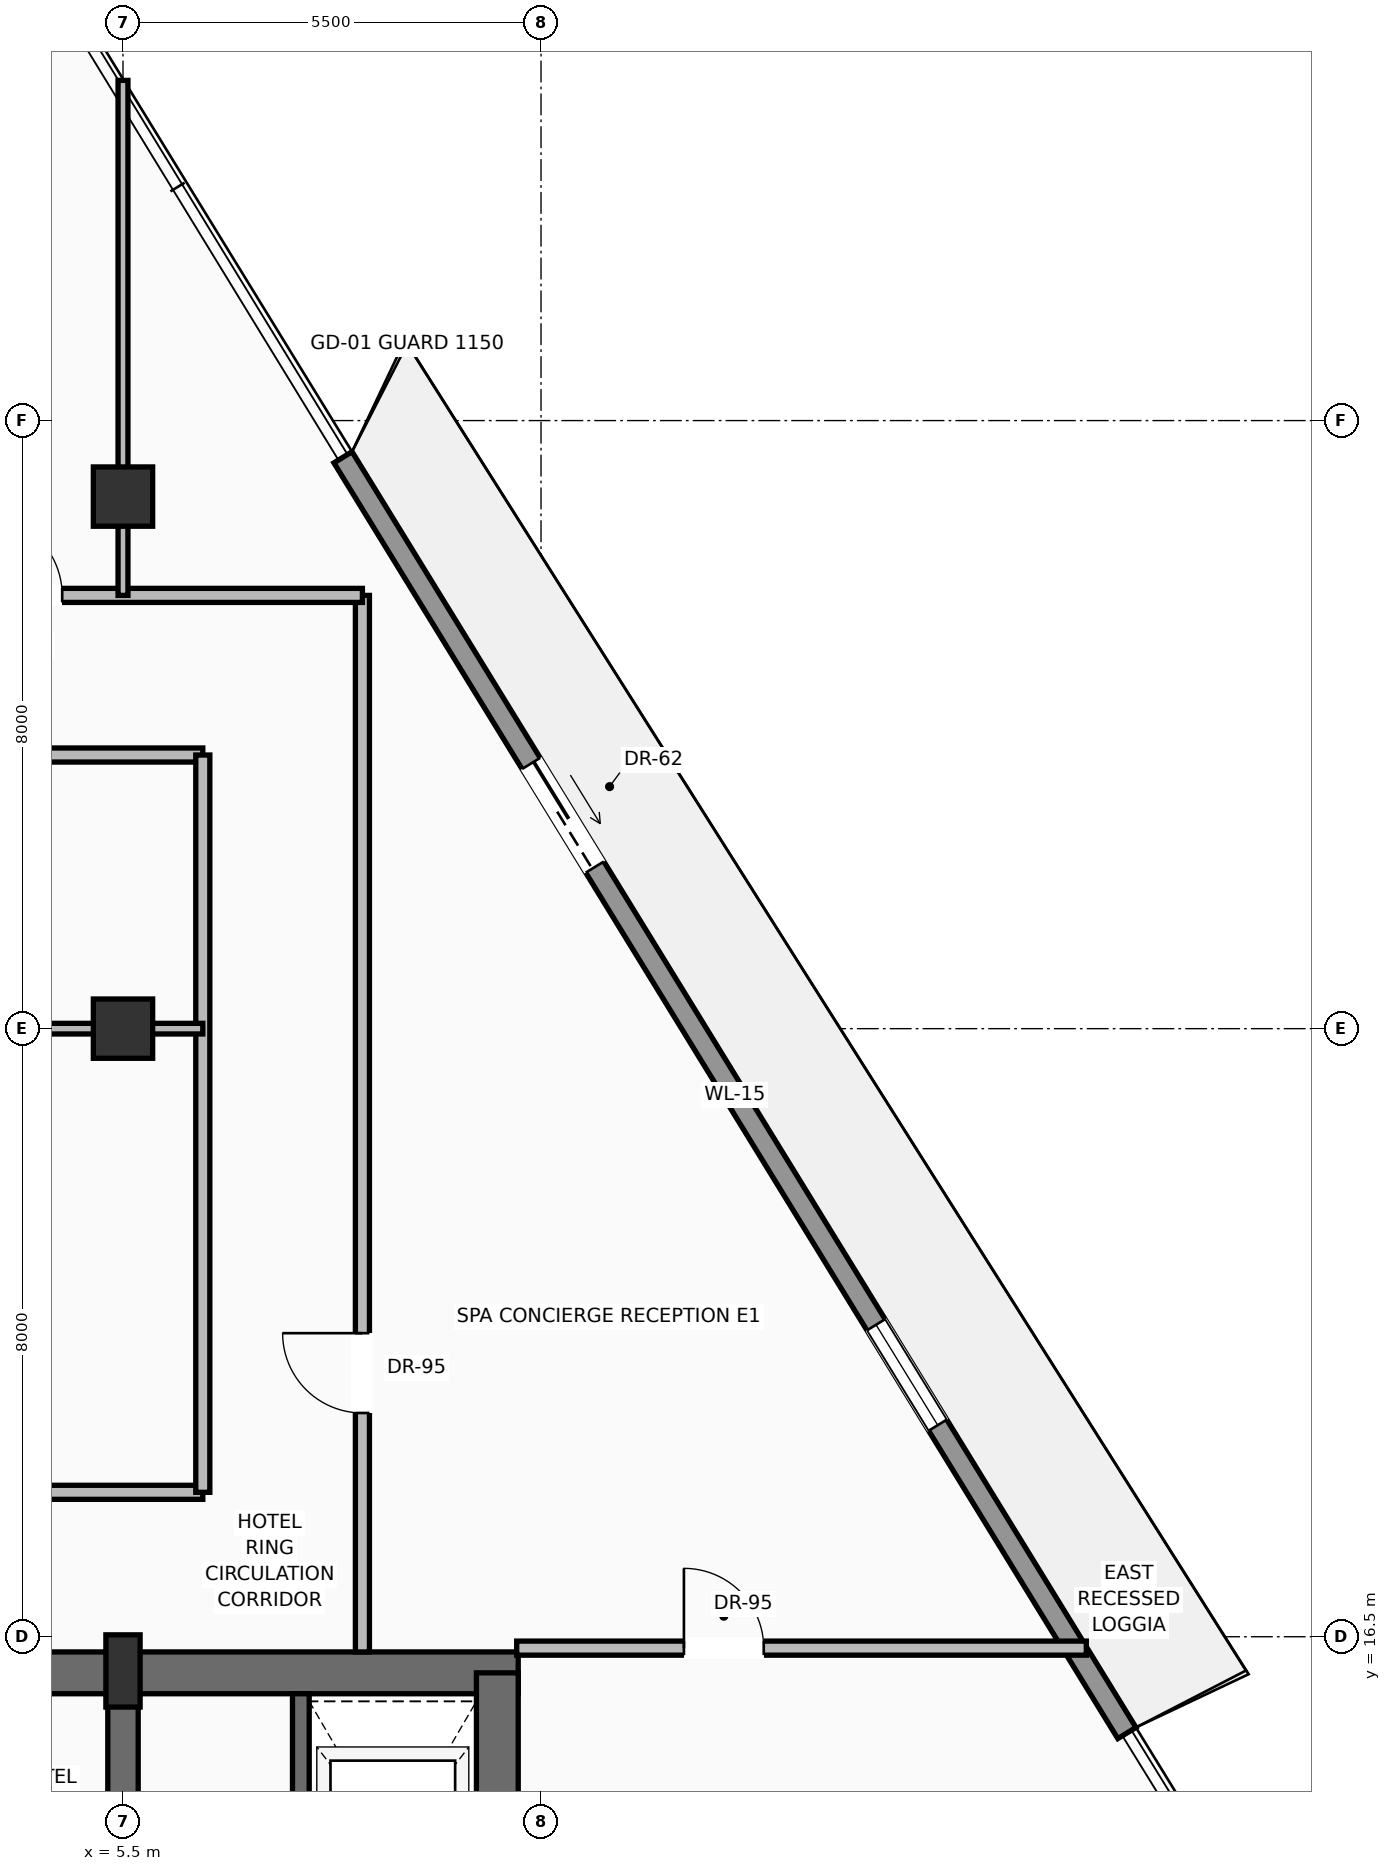
"""IFC4 building model, lengths in metres.
Left out: names, types, materials, properties, quantities, classifications, styles, units other than length and angle.
Written with IfcOpenShell. Run it as: python <this file> out.ifc"""

import sys

from ifc_helpers import new_model, si_unit, direction, frame, frame_2d, origin, origin_2d, place, context, subcontext, project, spatial, rectangle, extrude, source, transform, mapped, element, fill, save


model = new_model("IFC4")
c1 = context("Model", 3, precision=1e-05, world=origin(), true_north=direction((0.0, 1.0)))
c2 = subcontext(c1, "Body", "Model", "MODEL_VIEW")
j1 = project(units=[si_unit("LENGTHUNIT", "METRE"), si_unit("PLANEANGLEUNIT", "RADIAN")], contexts=[c1])
p1 = place(None, origin())
s1 = spatial("IfcSite", under=j1, at=p1, CompositionType="ELEMENT")
p2 = place(p1, origin())
s2 = spatial("IfcBuilding", under=s1, at=p2, CompositionType="ELEMENT")
p3 = place(p2, frame((0.0, 0.0, 244.15)))
s3 = spatial("IfcBuildingStorey", under=s2, at=p3, CompositionType="ELEMENT", Elevation=244.15)
p4 = place(p3, frame((-10.7, 16.025, 0.0), z_axis=(0.0, 0.0, 1.0), x_axis=(1.0, 0.0, 0.0)))
e1 = element("IfcWall", 1, at=p4, inside=s3, PredefinedType="SHEAR", context=c2, shape_type="SweptSolid", body=[
    extrude(rectangle(XDim=21.4, YDim=0.55, at=frame_2d((10.7, 0.0))), origin(), (0.0, 0.0, 1.0), 3.24),
])
p5 = place(p4, frame((3.27, 0.0, 0.0)))
e2 = element("IfcOpeningElement", 2, at=p5, cuts=e1, PredefinedType="OPENING", context=c2, shape_type="SweptSolid", body=[
    extrude(rectangle(XDim=1.3, YDim=2.3, at=frame_2d((0.65, 1.15))), frame((0.0, 0.285, 0.0), z_axis=(0.0, -1.0, 0.0), x_axis=(1.0, 0.0, 0.0)), (0.0, 0.0, 1.0), 0.57),
])
p6 = place(p4, frame((9.7, 0.0, 0.0)))
e3 = element("IfcOpeningElement", 3, at=p6, cuts=e1, PredefinedType="OPENING", context=c2, shape_type="SweptSolid", body=[
    extrude(rectangle(XDim=2.0, YDim=2.4, at=frame_2d((1.0, 1.2))), frame((0.0, 0.285, 0.0), z_axis=(0.0, -1.0, 0.0), x_axis=(1.0, 0.0, 0.0)), (0.0, 0.0, 1.0), 0.57),
])
p7 = place(p3, frame((10.425, 0.575, 0.0), z_axis=(0.0, 0.0, 1.0), x_axis=(0.0, 1.0, 0.0)))
e4 = element("IfcWall", 4, at=p7, inside=s3, PredefinedType="SHEAR", context=c2, shape_type="SweptSolid", body=[
    extrude(rectangle(XDim=15.45, YDim=0.55, at=frame_2d((7.725, 0.0))), origin(), (0.0, 0.0, 1.0), 3.24),
])
p8 = place(p3, frame((5.5, 0.575, 0.0), z_axis=(0.0, 0.0, 1.0), x_axis=(0.0, 1.0, 0.0)))
e5 = element("IfcWall", 5, at=p8, inside=s3, PredefinedType="SHEAR", context=c2, shape_type="SweptSolid", body=[
    extrude(rectangle(XDim=15.45, YDim=0.4, at=frame_2d((7.725, 0.0))), origin(), (0.0, 0.0, 1.0), 3.24),
])
p9 = place(p8, frame((8.925, 0.0, 0.0)))
e6 = element("IfcOpeningElement", 6, at=p9, cuts=e5, PredefinedType="OPENING", context=c2, shape_type="SweptSolid", body=[
    extrude(rectangle(XDim=1.1, YDim=2.2, at=frame_2d((0.55, 1.1))), frame((0.0, 0.21, 0.0), z_axis=(0.0, -1.0, 0.0), x_axis=(1.0, 0.0, 0.0)), (0.0, 0.0, 1.0), 0.42),
])
m1 = source(origin(), c2, "Body", "SweptSolid", [
    extrude(rectangle(XDim=0.45, YDim=0.95, at=origin_2d()), origin(), (0.0, 0.0, 1.0), 3.45),
])
p10 = place(p3, frame((5.5, 16.05, 0.0), z_axis=(0.0, 0.0, 1.0), x_axis=(1.0, 0.0, 0.0)))
e7 = element("IfcColumn", 7, at=p10, inside=s3, PredefinedType="PILASTER", context=c2, shape_type="MappedRepresentation", body=[
    mapped(m1, transform((0.0, 0.0, 0.0), scale=1.0)),
])
m2 = source(origin(), c2, "Body", "SweptSolid", [
    extrude(rectangle(XDim=0.78, YDim=0.78, at=origin_2d()), origin(), (0.0, 0.0, 1.0), 3.45),
])
for number, where, z_axis, x_axis in (
    (8, (5.5, 24.5, 0.0), (0.0, 0.0, 1.0), (1.0, 0.0, 0.0)),
    (9, (5.5, 31.5, 0.0), (0.0, 0.0, 1.0), (1.0, 0.0, 0.0)),
):
    element("IfcColumn", number, at=place(p3, frame(where, z_axis=z_axis, x_axis=x_axis)), inside=s3, PredefinedType="COLUMN", context=c2, shape_type="MappedRepresentation", body=[
        mapped(m2, transform((0.0, 0.0, 0.0), scale=1.0)),
    ])
p11 = place(p3, frame((8.394, 32.017, 0.0), z_axis=(0.0, 0.0, 1.0), x_axis=(0.523559364354, -0.851989197113, 0.0)))
e10 = element("IfcWall", 10, at=p11, inside=s3, PredefinedType="SOLIDWALL", context=c2, shape_type="SweptSolid", body=[
    extrude(rectangle(XDim=19.7, YDim=0.28, at=frame_2d((9.85, 0.0))), origin(), (0.0, 0.0, 1.0), 2.82),
])
p12 = place(p11, frame((4.728, 0.0, 0.0)))
e11 = element("IfcOpeningElement", 11, at=p12, cuts=e10, PredefinedType="OPENING", context=c2, shape_type="SweptSolid", body=[
    extrude(rectangle(XDim=1.6, YDim=2.35, at=frame_2d((0.8, 1.175))), frame((0.0, 0.15, 0.0), z_axis=(0.0, -1.0, 0.0), x_axis=(1.0, 0.0, 0.0)), (0.0, 0.0, 1.0), 0.3),
])
p13 = place(p11, frame((13.396, 0.0, 0.9)))
e12 = element("IfcOpeningElement", 12, at=p13, cuts=e10, PredefinedType="OPENING", context=c2, shape_type="SweptSolid", body=[
    extrude(rectangle(XDim=1.55, YDim=1.75, at=frame_2d((0.775, 0.875))), frame((0.0, 0.15, 0.0), z_axis=(0.0, -1.0, 0.0), x_axis=(1.0, 0.0, 0.0)), (0.0, 0.0, 1.0), 0.3),
])
p14 = place(p3, frame((7.84, 11.87, 0.0), z_axis=(0.0, 0.0, 1.0), x_axis=(0.0, 1.0, 0.0)))
e13 = element("IfcWall", 13, at=p14, inside=s3, PredefinedType="SOLIDWALL", context=c2, shape_type="SweptSolid", body=[
    extrude(rectangle(XDim=3.88, YDim=0.22, at=frame_2d((1.94, 0.0))), origin(), (0.0, 0.0, 1.0), 3.24),
])
p15 = place(p3, frame((-5.85, 18.4, 0.0), z_axis=(0.0, 0.0, 1.0), x_axis=(1.0, 0.0, 0.0)))
e14 = element("IfcWall", 14, at=p15, inside=s3, PredefinedType="PARTITIONING", context=c2, shape_type="SweptSolid", body=[
    extrude(rectangle(XDim=12.4, YDim=0.185, at=frame_2d((6.2, 0.0))), origin(), (0.0, 0.0, 1.0), 3.232),
])
p16 = place(p15, frame((5.725, 0.0, 0.0)))
e15 = element("IfcOpeningElement", 15, at=p16, cuts=e14, PredefinedType="OPENING", context=c2, shape_type="SweptSolid", body=[
    extrude(rectangle(XDim=0.95, YDim=2.2, at=frame_2d((0.475, 1.1))), frame((0.0, 0.103, 0.0), z_axis=(0.0, -1.0, 0.0), x_axis=(1.0, 0.0, 0.0)), (0.0, 0.0, 1.0), 0.205),
])
p17 = place(p3, frame((-5.85, 28.1, 0.0), z_axis=(0.0, 0.0, 1.0), x_axis=(1.0, 0.0, 0.0)))
e16 = element("IfcWall", 16, at=p17, inside=s3, PredefinedType="PARTITIONING", context=c2, shape_type="SweptSolid", body=[
    extrude(rectangle(XDim=12.4, YDim=0.185, at=frame_2d((6.2, 0.0))), origin(), (0.0, 0.0, 1.0), 2.885),
])
p18 = place(p17, frame((5.725, 0.0, 0.0)))
e17 = element("IfcOpeningElement", 17, at=p18, cuts=e16, PredefinedType="OPENING", context=c2, shape_type="SweptSolid", body=[
    extrude(rectangle(XDim=0.95, YDim=2.2, at=frame_2d((0.475, 1.1))), frame((0.0, 0.103, 0.0), z_axis=(0.0, -1.0, 0.0), x_axis=(1.0, 0.0, 0.0)), (0.0, 0.0, 1.0), 0.205),
])
p19 = place(p3, frame((6.55, 18.4, 0.0), z_axis=(0.0, 0.0, 1.0), x_axis=(0.0, 1.0, 0.0)))
e18 = element("IfcWall", 18, at=p19, inside=s3, PredefinedType="PARTITIONING", context=c2, shape_type="SweptSolid", body=[
    extrude(rectangle(XDim=9.7, YDim=0.185, at=frame_2d((4.85, 0.0))), origin(), (0.0, 0.0, 1.0), 3.232),
])
p20 = place(p3, frame((8.65, 16.3, 0.0), z_axis=(0.0, 0.0, 1.0), x_axis=(0.0, 1.0, 0.0)))
e19 = element("IfcWall", 19, at=p20, inside=s3, PredefinedType="PARTITIONING", context=c2, shape_type="SweptSolid", body=[
    extrude(rectangle(XDim=13.9, YDim=0.185, at=frame_2d((6.95, 0.0))), origin(), (0.0, 0.0, 1.0), 3.232),
])
p21 = place(p20, frame((3.144, 0.0, 0.0)))
e20 = element("IfcOpeningElement", 20, at=p21, cuts=e19, PredefinedType="OPENING", context=c2, shape_type="SweptSolid", body=[
    extrude(rectangle(XDim=1.05, YDim=2.25, at=frame_2d((0.525, 1.125))), frame((0.0, 0.103, 0.0), z_axis=(0.0, -1.0, 0.0), x_axis=(1.0, 0.0, 0.0)), (0.0, 0.0, 1.0), 0.205),
])
p22 = place(p3, frame((-7.95, 30.2, 0.0), z_axis=(0.0, 0.0, 1.0), x_axis=(1.0, 0.0, 0.0)))
e21 = element("IfcWall", 21, at=p22, inside=s3, PredefinedType="PARTITIONING", context=c2, shape_type="SweptSolid", body=[
    extrude(rectangle(XDim=16.6, YDim=0.185, at=frame_2d((8.3, 0.0))), origin(), (0.0, 0.0, 1.0), 3.232),
])
p23 = place(p22, frame((3.25, 0.0, 0.0)))
e22 = element("IfcOpeningElement", 22, at=p23, cuts=e21, PredefinedType="OPENING", context=c2, shape_type="SweptSolid", body=[
    extrude(rectangle(XDim=1.05, YDim=2.25, at=frame_2d((0.525, 1.125))), frame((0.0, 0.103, 0.0), z_axis=(0.0, -1.0, 0.0), x_axis=(1.0, 0.0, 0.0)), (0.0, 0.0, 1.0), 0.205),
])
p24 = place(p22, frame((7.775, 0.0, 0.0)))
e23 = element("IfcOpeningElement", 23, at=p24, cuts=e21, PredefinedType="OPENING", context=c2, shape_type="SweptSolid", body=[
    extrude(rectangle(XDim=1.05, YDim=2.25, at=frame_2d((0.525, 1.125))), frame((0.0, 0.103, 0.0), z_axis=(0.0, -1.0, 0.0), x_axis=(1.0, 0.0, 0.0)), (0.0, 0.0, 1.0), 0.205),
])
p25 = place(p22, frame((11.6, 0.0, 0.0)))
e24 = element("IfcOpeningElement", 24, at=p25, cuts=e21, PredefinedType="OPENING", context=c2, shape_type="SweptSolid", body=[
    extrude(rectangle(XDim=1.05, YDim=2.25, at=frame_2d((0.525, 1.125))), frame((0.0, 0.103, 0.0), z_axis=(0.0, -1.0, 0.0), x_axis=(1.0, 0.0, 0.0)), (0.0, 0.0, 1.0), 0.205),
])
p26 = place(p3, frame((-5.85, 24.5, 0.0), z_axis=(0.0, 0.0, 1.0), x_axis=(1.0, 0.0, 0.0)))
e25 = element("IfcWall", 25, at=p26, inside=s3, PredefinedType="PARTITIONING", context=c2, shape_type="SweptSolid", body=[
    extrude(rectangle(XDim=12.4, YDim=0.14, at=frame_2d((6.2, 0.0))), origin(), (0.0, 0.0, 1.0), 2.683),
])
p27 = place(p3, frame((10.68, 16.35, 0.0), z_axis=(0.0, 0.0, 1.0), x_axis=(1.0, 0.0, 0.0)))
e26 = element("IfcWall", 26, at=p27, inside=s3, PredefinedType="PARTITIONING", context=c2, shape_type="SweptSolid", body=[
    extrude(rectangle(XDim=7.495, YDim=0.185, at=frame_2d((3.747, 0.0))), origin(), (0.0, 0.0, 1.0), 3.232),
])
p28 = place(p27, frame((2.2, 0.0, 0.0)))
e27 = element("IfcOpeningElement", 27, at=p28, cuts=e26, PredefinedType="OPENING", context=c2, shape_type="SweptSolid", body=[
    extrude(rectangle(XDim=1.05, YDim=2.25, at=frame_2d((0.525, 1.125))), frame((0.0, 0.103, 0.0), z_axis=(0.0, -1.0, 0.0), x_axis=(1.0, 0.0, 0.0)), (0.0, 0.0, 1.0), 0.205),
])
p29 = place(p3, frame((5.5, 30.2, 0.0), z_axis=(0.0, 0.0, 1.0), x_axis=(0.0, 1.0, 0.0)))
e28 = element("IfcWall", 28, at=p29, inside=s3, PredefinedType="PARTITIONING", context=c2, shape_type="SweptSolid", body=[
    extrude(rectangle(XDim=6.776, YDim=0.13, at=frame_2d((3.388, 0.0))), origin(), (0.0, 0.0, 1.0), 2.683),
])
m3 = source(origin(), c2, "Body", "SweptSolid", [
    extrude(rectangle(XDim=1.6, YDim=2.35, at=frame_2d((0.8, 1.175))), frame((0.0, 0.025, 0.0), z_axis=(0.0, -1.0, 0.0), x_axis=(1.0, 0.0, 0.0)), (0.0, 0.0, 1.0), 0.05),
])
p30 = place(p12, origin())
e29 = element("IfcDoor", 29, at=p30, inside=s3, OperationType="SLIDING_TO_RIGHT", PredefinedType="DOOR", context=c2, shape_type="MappedRepresentation", body=[
    mapped(m3, transform((0.0, 0.0, 0.0), scale=1.0)),
])
fill(e11, e29)
m4 = source(origin(), c2, "Body", "SweptSolid", [
    extrude(rectangle(XDim=1.55, YDim=1.75, at=frame_2d((0.775, 0.875))), frame((0.0, 0.03, 0.0), z_axis=(0.0, -1.0, 0.0), x_axis=(1.0, 0.0, 0.0)), (0.0, 0.0, 1.0), 0.06),
])
p31 = place(p13, origin())
e30 = element("IfcWindow", 30, at=p31, inside=s3, PartitioningType="SINGLE_PANEL", PredefinedType="WINDOW", context=c2, shape_type="MappedRepresentation", body=[
    mapped(m4, transform((0.0, 0.0, 0.0), scale=1.0)),
])
fill(e12, e30)
m5 = source(origin(), c2, "Body", "SweptSolid", [
    extrude(rectangle(XDim=1.05, YDim=2.25, at=frame_2d((0.525, 1.125))), frame((0.0, 0.025, 0.0), z_axis=(0.0, -1.0, 0.0), x_axis=(1.0, 0.0, 0.0)), (0.0, 0.0, 1.0), 0.05),
])
p32 = place(p28, origin())
e31 = element("IfcDoor", 31, at=p32, inside=s3, OperationType="SINGLE_SWING_LEFT", PredefinedType="DOOR", context=c2, shape_type="MappedRepresentation", body=[
    mapped(m5, transform((0.0, 0.0, 0.0), scale=1.0)),
])
fill(e27, e31)
p33 = place(p21, origin())
e32 = element("IfcDoor", 32, at=p33, inside=s3, OperationType="SINGLE_SWING_RIGHT", PredefinedType="DOOR", context=c2, shape_type="MappedRepresentation", body=[
    mapped(m5, transform((0.0, 0.0, 0.0), scale=1.0)),
])
fill(e20, e32)
p34 = place(p25, origin())
e33 = element("IfcDoor", 33, at=p34, inside=s3, OperationType="SINGLE_SWING_LEFT", PredefinedType="DOOR", context=c2, shape_type="MappedRepresentation", body=[
    mapped(m5, transform((0.0, 0.0, 0.0), scale=1.0)),
])
fill(e24, e33)
save(model, sys.argv[1])
